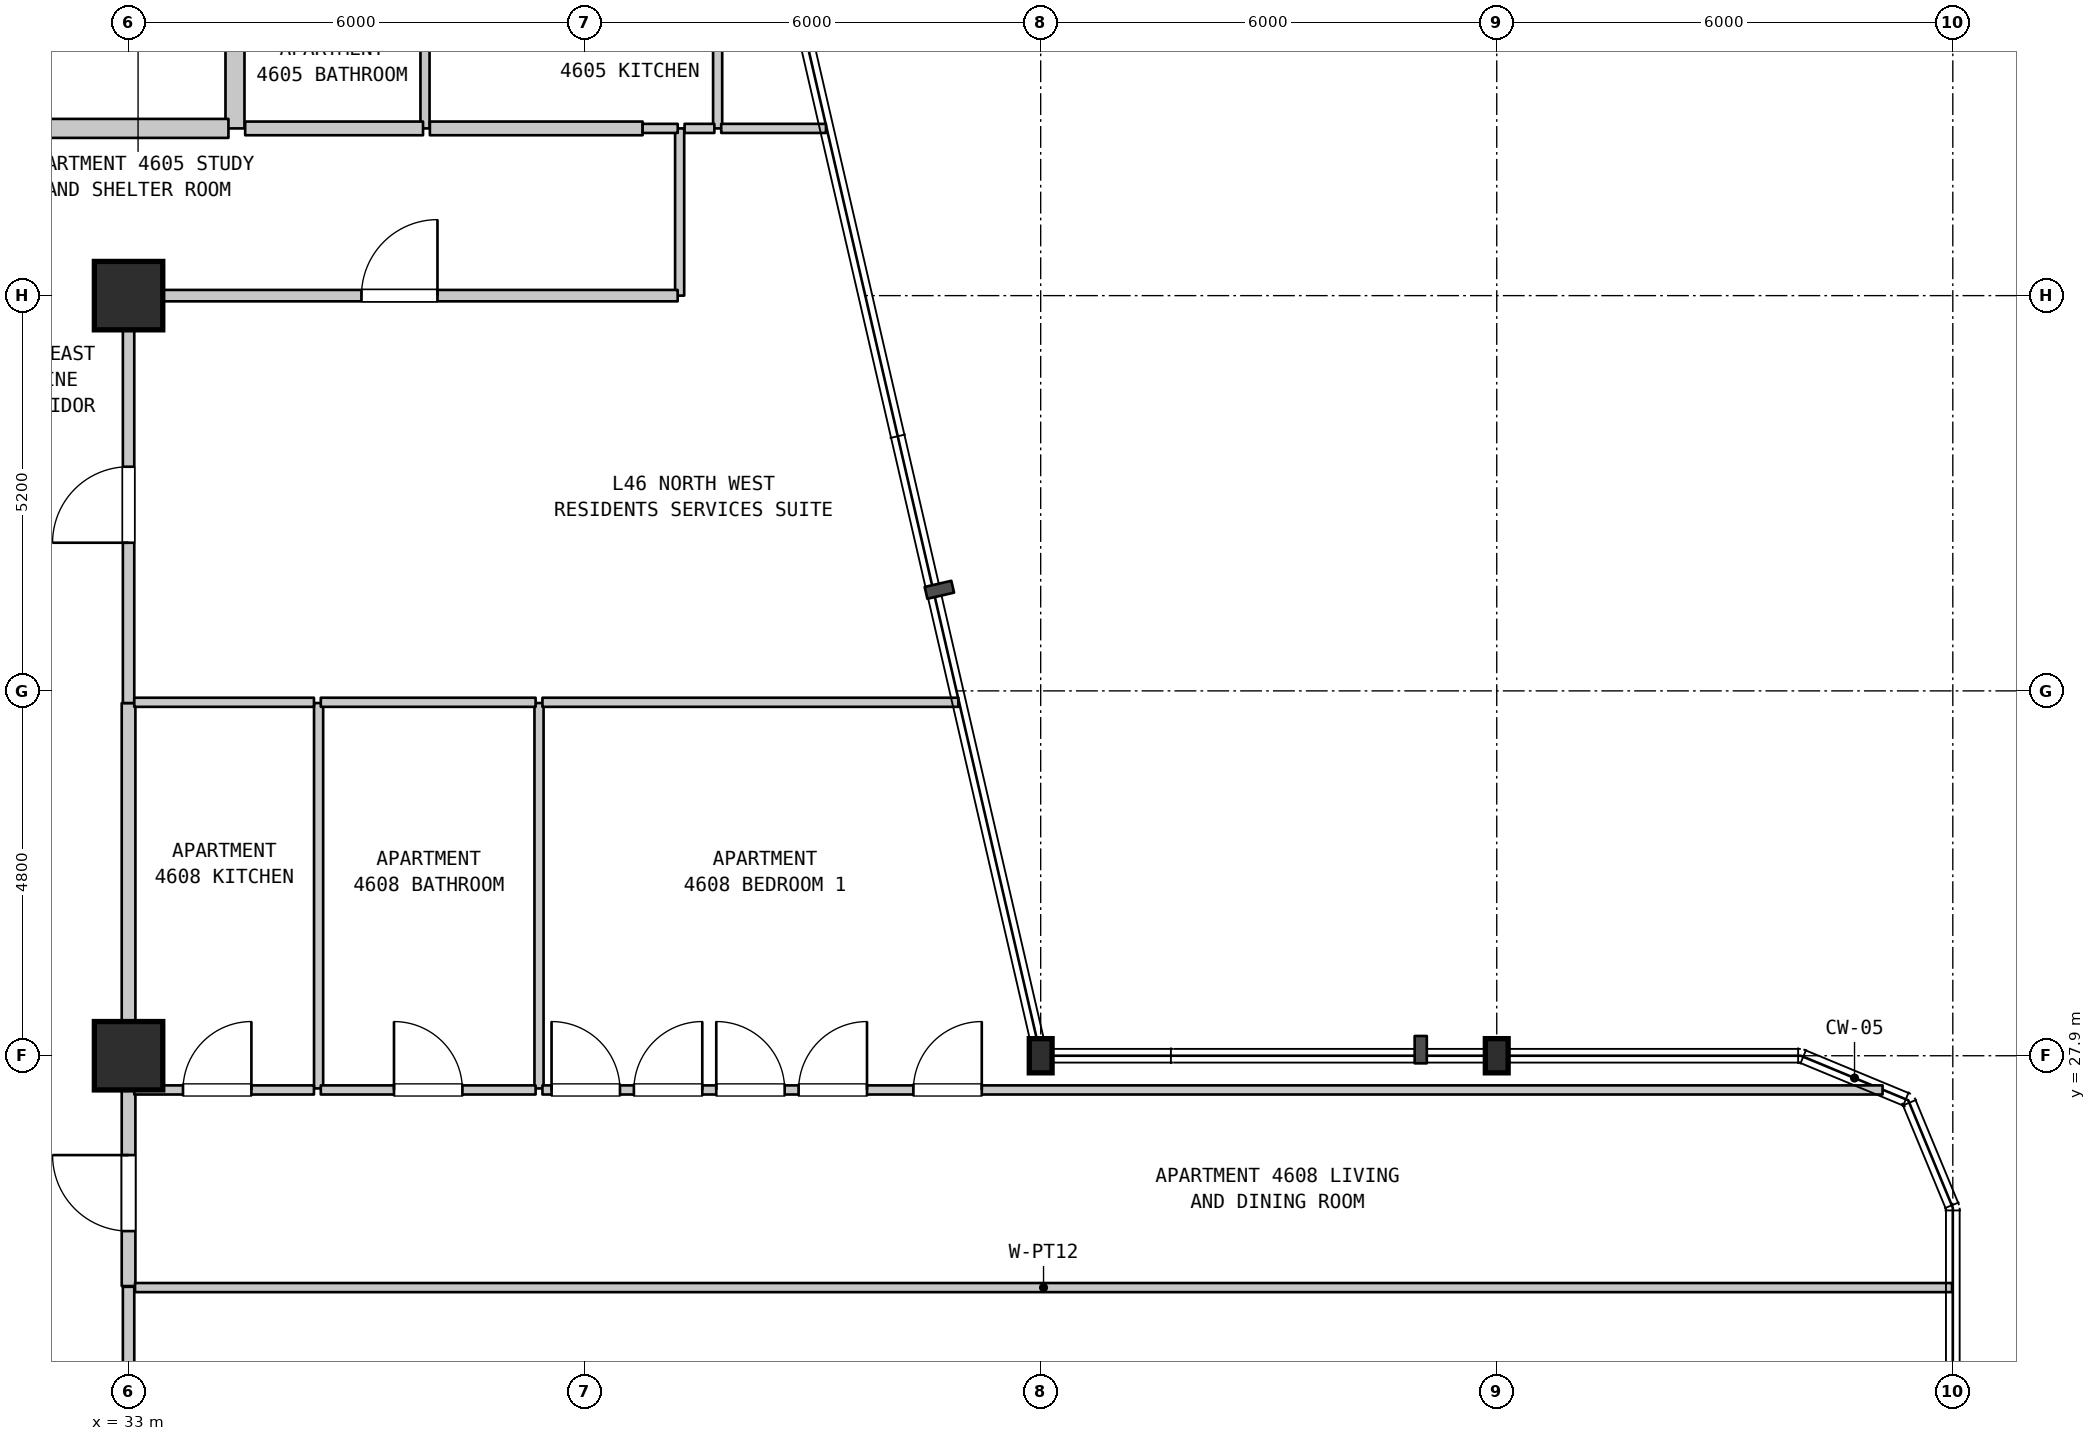
"""IFC4 building model, lengths in metres.
Left out: names, types, materials, properties, quantities, classifications, styles, units other than length and angle.
Written with IfcOpenShell. Run it as: python <this file> out.ifc"""

import sys

from ifc_helpers import new_model, si_unit, direction, frame, frame_2d, origin, origin_2d, place, context, subcontext, project, spatial, rectangle, i_section, extrude, element, fill, save


model = new_model("IFC4")
c1 = context("Model", 3, precision=1e-05, world=origin(), true_north=direction((0.0, 1.0)))
c2 = subcontext(c1, "Body", "Model", "MODEL_VIEW")
j1 = project(units=[si_unit("LENGTHUNIT", "METRE"), si_unit("PLANEANGLEUNIT", "RADIAN")], contexts=[c1])
p1 = place(None, origin())
s1 = spatial("IfcSite", under=j1, at=p1, CompositionType="ELEMENT")
p2 = place(p1, origin())
s2 = spatial("IfcBuilding", under=s1, at=p2, CompositionType="ELEMENT")
p3 = place(p2, frame((0.0, 0.0, 188.4)))
s3 = spatial("IfcBuildingStorey", under=s2, at=p3, CompositionType="ELEMENT", Elevation=188.4)
for number, where, z_axis, x_axis in (
    (1, (33.0, 27.9, 0.0), (0.0, 0.0, 1.0), (1.0, 0.0, 0.0)),
    (2, (33.0, 37.9, 0.0), (0.0, 0.0, 1.0), (1.0, 0.0, 0.0)),
):
    element("IfcColumn", number, at=place(p3, frame(where, z_axis=z_axis, x_axis=x_axis)), inside=s3, PredefinedType="COLUMN", context=c2, shape_type="SweptSolid", body=[
        extrude(rectangle(XDim=0.9, YDim=0.9, at=origin_2d()), origin(), (0.0, 0.0, 1.0), 3.7),
    ])
for number, where, z_axis, x_axis in (
    (3, (45.0, 27.9, 0.0), (0.0, 0.0, 1.0), (1.0, 0.0, 0.0)),
    (4, (51.0, 27.9, 0.0), (0.0, 0.0, 1.0), (1.0, 0.0, 0.0)),
):
    element("IfcColumn", number, at=place(p3, frame(where, z_axis=z_axis, x_axis=x_axis)), inside=s3, PredefinedType="COLUMN", context=c2, shape_type="SweptSolid", body=[
        extrude(i_section(OverallWidth=0.3, OverallDepth=0.45, WebThickness=0.014, FlangeThickness=0.026, FilletRadius=0.027, at=origin_2d()), origin(), (0.0, 0.0, 1.0), 3.7),
    ])
p4 = place(p3, frame((33.0, 19.51, 0.0), z_axis=(0.0, 0.0, 1.0), x_axis=(0.0, 1.0, 0.0)))
e5 = element("IfcWall", 5, at=p4, inside=s3, PredefinedType="STANDARD", context=c2, shape_type="SweptSolid", body=[
    extrude(rectangle(XDim=5.35, YDim=0.15, at=frame_2d((2.675, 0.0))), origin(), (0.0, 0.0, 1.0), 2.99),
])
p5 = place(p4, frame((1.534, 0.0, 0.0)))
e6 = element("IfcOpeningElement", 6, at=p5, cuts=e5, PredefinedType="OPENING", context=c2, shape_type="SweptSolid", body=[
    extrude(rectangle(XDim=1.0, YDim=2.15, at=frame_2d((0.5, 1.075))), frame((0.0, 0.085, 0.0), z_axis=(0.0, -1.0, 0.0), x_axis=(1.0, 0.0, 0.0)), (0.0, 0.0, 1.0), 0.17),
])
p6 = place(p3, frame((33.0, 24.87, 0.0), z_axis=(0.0, 0.0, 1.0), x_axis=(0.0, 1.0, 0.0)))
e7 = element("IfcWall", 7, at=p6, inside=s3, PredefinedType="STANDARD", context=c2, shape_type="SweptSolid", body=[
    extrude(rectangle(XDim=2.6, YDim=0.18, at=frame_2d((1.3, 0.0))), origin(), (0.0, 0.0, 1.0), 2.99),
])
p7 = place(p6, frame((0.723, 0.0, 0.0)))
e8 = element("IfcOpeningElement", 8, at=p7, cuts=e7, PredefinedType="OPENING", context=c2, shape_type="SweptSolid", body=[
    extrude(rectangle(XDim=1.0, YDim=2.15, at=frame_2d((0.5, 1.075))), frame((0.0, 0.1, 0.0), z_axis=(0.0, -1.0, 0.0), x_axis=(1.0, 0.0, 0.0)), (0.0, 0.0, 1.0), 0.2),
])
p8 = place(p3, frame((33.0, 27.47, 0.0), z_axis=(0.0, 0.0, 1.0), x_axis=(0.0, 1.0, 0.0)))
e9 = element("IfcWall", 9, at=p8, inside=s3, PredefinedType="STANDARD", context=c2, shape_type="SweptSolid", body=[
    extrude(rectangle(XDim=5.07, YDim=0.18, at=frame_2d((2.535, 0.0))), origin(), (0.0, 0.0, 1.0), 2.89),
])
p9 = place(p3, frame((33.0, 32.54, 0.0), z_axis=(0.0, 0.0, 1.0), x_axis=(0.0, 1.0, 0.0)))
e10 = element("IfcWall", 10, at=p9, inside=s3, PredefinedType="STANDARD", context=c2, shape_type="SweptSolid", body=[
    extrude(rectangle(XDim=5.36, YDim=0.15, at=frame_2d((2.68, 0.0))), origin(), (0.0, 0.0, 1.0), 2.89),
])
p10 = place(p9, frame((2.109, 0.0, 0.0)))
e11 = element("IfcOpeningElement", 11, at=p10, cuts=e10, PredefinedType="OPENING", context=c2, shape_type="SweptSolid", body=[
    extrude(rectangle(XDim=1.0, YDim=2.15, at=frame_2d((0.5, 1.075))), frame((0.0, 0.085, 0.0), z_axis=(0.0, -1.0, 0.0), x_axis=(1.0, 0.0, 0.0)), (0.0, 0.0, 1.0), 0.17),
])
p11 = place(p3, frame((34.4, 40.1, 0.0), z_axis=(0.0, 0.0, 1.0), x_axis=(0.0, 1.0, 0.0)))
e12 = element("IfcWall", 12, at=p11, inside=s3, PredefinedType="STANDARD", context=c2, shape_type="SweptSolid", body=[
    extrude(rectangle(XDim=2.3, YDim=0.25, at=frame_2d((1.15, 0.0))), origin(), (0.0, 0.0, 1.0), 3.39),
])
p12 = place(p3, frame((35.5, 27.47, 0.0), z_axis=(0.0, 0.0, 1.0), x_axis=(0.0, 1.0, 0.0)))
e13 = element("IfcWall", 13, at=p12, inside=s3, PredefinedType="PARTITIONING", context=c2, shape_type="SweptSolid", body=[
    extrude(rectangle(XDim=5.07, YDim=0.12, at=frame_2d((2.535, 0.0))), origin(), (0.0, 0.0, 1.0), 3.39),
])
p13 = place(p3, frame((36.9, 40.1, 0.0), z_axis=(0.0, 0.0, 1.0), x_axis=(0.0, 1.0, 0.0)))
e14 = element("IfcWall", 14, at=p13, inside=s3, PredefinedType="PARTITIONING", context=c2, shape_type="SweptSolid", body=[
    extrude(rectangle(XDim=2.3, YDim=0.12, at=frame_2d((1.15, 0.0))), origin(), (0.0, 0.0, 1.0), 3.39),
])
p14 = place(p3, frame((38.4, 27.47, 0.0), z_axis=(0.0, 0.0, 1.0), x_axis=(0.0, 1.0, 0.0)))
e15 = element("IfcWall", 15, at=p14, inside=s3, PredefinedType="PARTITIONING", context=c2, shape_type="SweptSolid", body=[
    extrude(rectangle(XDim=5.07, YDim=0.12, at=frame_2d((2.535, 0.0))), origin(), (0.0, 0.0, 1.0), 3.39),
])
p15 = place(p3, frame((40.25, 37.9, 0.0), z_axis=(0.0, 0.0, 1.0), x_axis=(0.0, 1.0, 0.0)))
e16 = element("IfcWall", 16, at=p15, inside=s3, PredefinedType="PARTITIONING", context=c2, shape_type="SweptSolid", body=[
    extrude(rectangle(XDim=2.2, YDim=0.12, at=frame_2d((1.1, 0.0))), origin(), (0.0, 0.0, 1.0), 3.39),
])
p16 = place(p3, frame((40.75, 40.1, 0.0), z_axis=(0.0, 0.0, 1.0), x_axis=(0.0, 1.0, 0.0)))
e17 = element("IfcWall", 17, at=p16, inside=s3, PredefinedType="PARTITIONING", context=c2, shape_type="SweptSolid", body=[
    extrude(rectangle(XDim=2.3, YDim=0.12, at=frame_2d((1.15, 0.0))), origin(), (0.0, 0.0, 1.0), 3.39),
])
p17 = place(p3, frame((33.085, 24.85, 0.0), z_axis=(0.0, 0.0, 1.0), x_axis=(1.0, 0.0, 0.0)))
e18 = element("IfcWall", 18, at=p17, inside=s3, PredefinedType="PARTITIONING", context=c2, shape_type="SweptSolid", body=[
    extrude(rectangle(XDim=23.905, YDim=0.12, at=frame_2d((11.953, 0.0))), origin(), (0.0, 0.0, 1.0), 3.39),
])
p18 = place(p3, frame((33.075, 27.45, 0.0), z_axis=(0.0, 0.0, 1.0), x_axis=(1.0, 0.0, 0.0)))
e19 = element("IfcWall", 19, at=p18, inside=s3, PredefinedType="PARTITIONING", context=c2, shape_type="SweptSolid", body=[
    extrude(rectangle(XDim=2.364, YDim=0.12, at=frame_2d((1.182, 0.0))), origin(), (0.0, 0.0, 1.0), 3.39),
])
p19 = place(p18, frame((0.641, 0.0, 0.0)))
e20 = element("IfcOpeningElement", 20, at=p19, cuts=e19, PredefinedType="OPENING", context=c2, shape_type="SweptSolid", body=[
    extrude(rectangle(XDim=0.9, YDim=2.15, at=frame_2d((0.45, 1.075))), frame((0.0, 0.07, 0.0), z_axis=(0.0, -1.0, 0.0), x_axis=(1.0, 0.0, 0.0)), (0.0, 0.0, 1.0), 0.14),
])
p20 = place(p3, frame((35.529, 27.45, 0.0), z_axis=(0.0, 0.0, 1.0), x_axis=(1.0, 0.0, 0.0)))
e21 = element("IfcWall", 21, at=p20, inside=s3, PredefinedType="PARTITIONING", context=c2, shape_type="SweptSolid", body=[
    extrude(rectangle(XDim=2.826, YDim=0.12, at=frame_2d((1.413, 0.0))), origin(), (0.0, 0.0, 1.0), 3.39),
])
p21 = place(p20, frame((0.963, 0.0, 0.0)))
e22 = element("IfcOpeningElement", 22, at=p21, cuts=e21, PredefinedType="OPENING", context=c2, shape_type="SweptSolid", body=[
    extrude(rectangle(XDim=0.9, YDim=2.1, at=frame_2d((0.45, 1.05))), frame((0.0, 0.07, 0.0), z_axis=(0.0, -1.0, 0.0), x_axis=(1.0, 0.0, 0.0)), (0.0, 0.0, 1.0), 0.14),
])
p22 = place(p3, frame((38.445, 27.45, 0.0), z_axis=(0.0, 0.0, 1.0), x_axis=(1.0, 0.0, 0.0)))
e23 = element("IfcWall", 23, at=p22, inside=s3, PredefinedType="PARTITIONING", context=c2, shape_type="SweptSolid", body=[
    extrude(rectangle(XDim=17.631, YDim=0.12, at=frame_2d((8.815, 0.0))), origin(), (0.0, 0.0, 1.0), 3.39),
])
p23 = place(p22, frame((4.88, 0.0, 0.0)))
e24 = element("IfcOpeningElement", 24, at=p23, cuts=e23, PredefinedType="OPENING", context=c2, shape_type="SweptSolid", body=[
    extrude(rectangle(XDim=0.9, YDim=2.15, at=frame_2d((0.45, 1.075))), frame((0.0, 0.07, 0.0), z_axis=(0.0, -1.0, 0.0), x_axis=(1.0, 0.0, 0.0)), (0.0, 0.0, 1.0), 0.14),
])
p24 = place(p22, frame((0.12, 0.0, 0.0)))
e25 = element("IfcOpeningElement", 25, at=p24, cuts=e23, PredefinedType="OPENING", context=c2, shape_type="SweptSolid", body=[
    extrude(rectangle(XDim=0.9, YDim=2.15, at=frame_2d((0.45, 1.075))), frame((0.0, 0.07, 0.0), z_axis=(0.0, -1.0, 0.0), x_axis=(1.0, 0.0, 0.0)), (0.0, 0.0, 1.0), 0.14),
])
p25 = place(p22, frame((1.203, 0.0, 0.0)))
e26 = element("IfcOpeningElement", 26, at=p25, cuts=e23, PredefinedType="OPENING", context=c2, shape_type="SweptSolid", body=[
    extrude(rectangle(XDim=0.9, YDim=2.15, at=frame_2d((0.45, 1.075))), frame((0.0, 0.07, 0.0), z_axis=(0.0, -1.0, 0.0), x_axis=(1.0, 0.0, 0.0)), (0.0, 0.0, 1.0), 0.14),
])
p26 = place(p22, frame((2.287, 0.0, 0.0)))
e27 = element("IfcOpeningElement", 27, at=p26, cuts=e23, PredefinedType="OPENING", context=c2, shape_type="SweptSolid", body=[
    extrude(rectangle(XDim=0.9, YDim=2.15, at=frame_2d((0.45, 1.075))), frame((0.0, 0.07, 0.0), z_axis=(0.0, -1.0, 0.0), x_axis=(1.0, 0.0, 0.0)), (0.0, 0.0, 1.0), 0.14),
])
p27 = place(p22, frame((3.37, 0.0, 0.0)))
e28 = element("IfcOpeningElement", 28, at=p27, cuts=e23, PredefinedType="OPENING", context=c2, shape_type="SweptSolid", body=[
    extrude(rectangle(XDim=0.9, YDim=2.15, at=frame_2d((0.45, 1.075))), frame((0.0, 0.07, 0.0), z_axis=(0.0, -1.0, 0.0), x_axis=(1.0, 0.0, 0.0)), (0.0, 0.0, 1.0), 0.14),
])
p28 = place(p3, frame((33.075, 32.55, 0.0), z_axis=(0.0, 0.0, 1.0), x_axis=(1.0, 0.0, 0.0)))
e29 = element("IfcWall", 29, at=p28, inside=s3, PredefinedType="PARTITIONING", context=c2, shape_type="SweptSolid", body=[
    extrude(rectangle(XDim=2.364, YDim=0.12, at=frame_2d((1.182, 0.0))), origin(), (0.0, 0.0, 1.0), 3.39),
])
p29 = place(p3, frame((35.529, 32.55, 0.0), z_axis=(0.0, 0.0, 1.0), x_axis=(1.0, 0.0, 0.0)))
e30 = element("IfcWall", 30, at=p29, inside=s3, PredefinedType="PARTITIONING", context=c2, shape_type="SweptSolid", body=[
    extrude(rectangle(XDim=2.826, YDim=0.12, at=frame_2d((1.413, 0.0))), origin(), (0.0, 0.0, 1.0), 3.39),
])
p30 = place(p3, frame((38.445, 32.55, 0.0), z_axis=(0.0, 0.0, 1.0), x_axis=(1.0, 0.0, 0.0)))
e31 = element("IfcWall", 31, at=p30, inside=s3, PredefinedType="PARTITIONING", context=c2, shape_type="SweptSolid", body=[
    extrude(rectangle(XDim=5.472, YDim=0.12, at=frame_2d((2.736, 0.0))), origin(), (0.0, 0.0, 1.0), 3.39),
])
p31 = place(p3, frame((33.06, 37.9, 0.0), z_axis=(0.0, 0.0, 1.0), x_axis=(1.0, 0.0, 0.0)))
e32 = element("IfcWall", 32, at=p31, inside=s3, PredefinedType="STANDARD", context=c2, shape_type="SweptSolid", body=[
    extrude(rectangle(XDim=7.164, YDim=0.15, at=frame_2d((3.582, 0.0))), origin(), (0.0, 0.0, 1.0), 3.39),
])
p32 = place(p31, frame((3.004, 0.0, 0.0)))
e33 = element("IfcOpeningElement", 33, at=p32, cuts=e32, PredefinedType="OPENING", context=c2, shape_type="SweptSolid", body=[
    extrude(rectangle(XDim=1.0, YDim=2.15, at=frame_2d((0.5, 1.075))), frame((0.0, 0.085, 0.0), z_axis=(0.0, -1.0, 0.0), x_axis=(1.0, 0.0, 0.0)), (0.0, 0.0, 1.0), 0.17),
])
p33 = place(p3, frame((31.95, 40.1, 0.0), z_axis=(0.0, 0.0, 1.0), x_axis=(1.0, 0.0, 0.0)))
e34 = element("IfcWall", 34, at=p33, inside=s3, PredefinedType="STANDARD", context=c2, shape_type="SweptSolid", body=[
    extrude(rectangle(XDim=2.364, YDim=0.25, at=frame_2d((1.182, 0.0))), origin(), (0.0, 0.0, 1.0), 3.39),
])
p34 = place(p3, frame((34.534, 40.1, 0.0), z_axis=(0.0, 0.0, 1.0), x_axis=(1.0, 0.0, 0.0)))
e35 = element("IfcWall", 35, at=p34, inside=s3, PredefinedType="STANDARD", context=c2, shape_type="SweptSolid", body=[
    extrude(rectangle(XDim=2.34, YDim=0.18, at=frame_2d((1.17, 0.0))), origin(), (0.0, 0.0, 1.0), 3.39),
])
p35 = place(p3, frame((36.964, 40.1, 0.0), z_axis=(0.0, 0.0, 1.0), x_axis=(1.0, 0.0, 0.0)))
e36 = element("IfcWall", 36, at=p35, inside=s3, PredefinedType="STANDARD", context=c2, shape_type="SweptSolid", body=[
    extrude(rectangle(XDim=2.799, YDim=0.18, at=frame_2d((1.399, 0.0))), origin(), (0.0, 0.0, 1.0), 3.39),
])
p36 = place(p3, frame((39.763, 40.1, 0.0), z_axis=(0.0, 0.0, 1.0), x_axis=(1.0, 0.0, 0.0)))
e37 = element("IfcWall", 37, at=p36, inside=s3, PredefinedType="PARTITIONING", context=c2, shape_type="SweptSolid", body=[
    extrude(rectangle(XDim=0.462, YDim=0.12, at=frame_2d((0.231, 0.0))), origin(), (0.0, 0.0, 1.0), 3.39),
])
p37 = place(p3, frame((40.315, 40.1, 0.0), z_axis=(0.0, 0.0, 1.0), x_axis=(1.0, 0.0, 0.0)))
e38 = element("IfcWall", 38, at=p37, inside=s3, PredefinedType="PARTITIONING", context=c2, shape_type="SweptSolid", body=[
    extrude(rectangle(XDim=0.392, YDim=0.12, at=frame_2d((0.196, 0.0))), origin(), (0.0, 0.0, 1.0), 3.39),
])
p38 = place(p3, frame((40.797, 40.1, 0.0), z_axis=(0.0, 0.0, 1.0), x_axis=(1.0, 0.0, 0.0)))
e39 = element("IfcWall", 39, at=p38, inside=s3, PredefinedType="PARTITIONING", context=c2, shape_type="SweptSolid", body=[
    extrude(rectangle(XDim=1.378, YDim=0.12, at=frame_2d((0.689, 0.0))), origin(), (0.0, 0.0, 1.0), 3.39),
])
p39 = place(p7, origin())
e40 = element("IfcDoor", 40, at=p39, inside=s3, OperationType="SINGLE_SWING_RIGHT", PredefinedType="DOOR", context=c2, shape_type="SweptSolid", body=[
    extrude(rectangle(XDim=1.0, YDim=2.15, at=frame_2d((0.5, 1.075))), frame((0.0, 0.025, 0.0), z_axis=(0.0, -1.0, 0.0), x_axis=(1.0, 0.0, 0.0)), (0.0, 0.0, 1.0), 0.05),
])
fill(e8, e40)
p40 = place(p10, origin())
e41 = element("IfcDoor", 41, at=p40, inside=s3, OperationType="SINGLE_SWING_LEFT", PredefinedType="DOOR", context=c2, shape_type="SweptSolid", body=[
    extrude(rectangle(XDim=1.0, YDim=2.15, at=frame_2d((0.5, 1.075))), frame((0.0, 0.025, 0.0), z_axis=(0.0, -1.0, 0.0), x_axis=(1.0, 0.0, 0.0)), (0.0, 0.0, 1.0), 0.05),
])
fill(e11, e41)
p41 = place(p19, origin())
e42 = element("IfcDoor", 42, at=p41, inside=s3, OperationType="SINGLE_SWING_RIGHT", PredefinedType="DOOR", context=c2, shape_type="SweptSolid", body=[
    extrude(rectangle(XDim=0.9, YDim=2.15, at=frame_2d((0.45, 1.075))), frame((0.0, 0.025, 0.0), z_axis=(0.0, -1.0, 0.0), x_axis=(1.0, 0.0, 0.0)), (0.0, 0.0, 1.0), 0.05),
])
fill(e20, e42)
p42 = place(p21, origin())
e43 = element("IfcDoor", 43, at=p42, inside=s3, OperationType="SINGLE_SWING_LEFT", PredefinedType="DOOR", context=c2, shape_type="SweptSolid", body=[
    extrude(rectangle(XDim=0.9, YDim=2.1, at=frame_2d((0.45, 1.05))), frame((0.0, 0.025, 0.0), z_axis=(0.0, -1.0, 0.0), x_axis=(1.0, 0.0, 0.0)), (0.0, 0.0, 1.0), 0.05),
])
fill(e22, e43)
p43 = place(p23, origin())
e44 = element("IfcDoor", 44, at=p43, inside=s3, OperationType="SINGLE_SWING_RIGHT", PredefinedType="DOOR", context=c2, shape_type="SweptSolid", body=[
    extrude(rectangle(XDim=0.9, YDim=2.15, at=frame_2d((0.45, 1.075))), frame((0.0, 0.025, 0.0), z_axis=(0.0, -1.0, 0.0), x_axis=(1.0, 0.0, 0.0)), (0.0, 0.0, 1.0), 0.05),
])
fill(e24, e44)
p44 = place(p24, origin())
e45 = element("IfcDoor", 45, at=p44, inside=s3, OperationType="SINGLE_SWING_LEFT", PredefinedType="DOOR", context=c2, shape_type="SweptSolid", body=[
    extrude(rectangle(XDim=0.9, YDim=2.15, at=frame_2d((0.45, 1.075))), frame((0.0, 0.025, 0.0), z_axis=(0.0, -1.0, 0.0), x_axis=(1.0, 0.0, 0.0)), (0.0, 0.0, 1.0), 0.05),
])
fill(e25, e45)
p45 = place(p25, origin())
e46 = element("IfcDoor", 46, at=p45, inside=s3, OperationType="SINGLE_SWING_RIGHT", PredefinedType="DOOR", context=c2, shape_type="SweptSolid", body=[
    extrude(rectangle(XDim=0.9, YDim=2.15, at=frame_2d((0.45, 1.075))), frame((0.0, 0.025, 0.0), z_axis=(0.0, -1.0, 0.0), x_axis=(1.0, 0.0, 0.0)), (0.0, 0.0, 1.0), 0.05),
])
fill(e26, e46)
p46 = place(p26, origin())
e47 = element("IfcDoor", 47, at=p46, inside=s3, OperationType="SINGLE_SWING_LEFT", PredefinedType="DOOR", context=c2, shape_type="SweptSolid", body=[
    extrude(rectangle(XDim=0.9, YDim=2.15, at=frame_2d((0.45, 1.075))), frame((0.0, 0.025, 0.0), z_axis=(0.0, -1.0, 0.0), x_axis=(1.0, 0.0, 0.0)), (0.0, 0.0, 1.0), 0.05),
])
fill(e27, e47)
p47 = place(p27, origin())
e48 = element("IfcDoor", 48, at=p47, inside=s3, OperationType="SINGLE_SWING_RIGHT", PredefinedType="DOOR", context=c2, shape_type="SweptSolid", body=[
    extrude(rectangle(XDim=0.9, YDim=2.15, at=frame_2d((0.45, 1.075))), frame((0.0, 0.025, 0.0), z_axis=(0.0, -1.0, 0.0), x_axis=(1.0, 0.0, 0.0)), (0.0, 0.0, 1.0), 0.05),
])
fill(e28, e48)
p48 = place(p32, origin())
e49 = element("IfcDoor", 49, at=p48, inside=s3, OperationType="SINGLE_SWING_RIGHT", PredefinedType="DOOR", context=c2, shape_type="SweptSolid", body=[
    extrude(rectangle(XDim=1.0, YDim=2.15, at=frame_2d((0.5, 1.075))), frame((0.0, 0.025, 0.0), z_axis=(0.0, -1.0, 0.0), x_axis=(1.0, 0.0, 0.0)), (0.0, 0.0, 1.0), 0.05),
])
fill(e33, e49)
save(model, sys.argv[1])
